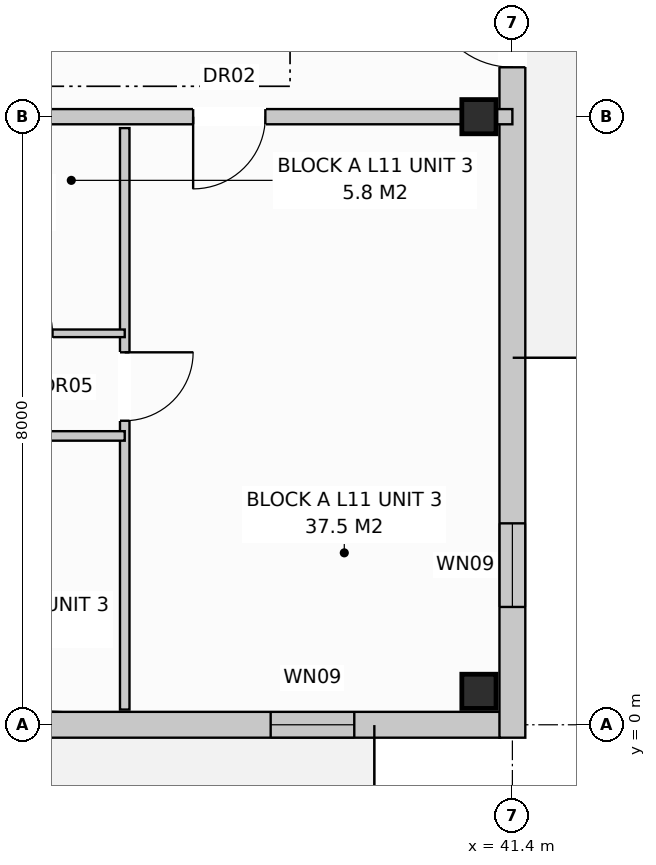
"""IFC4 building model, lengths in metres.
Left out: names, types, materials, properties, quantities, classifications, styles, units other than length and angle.
Written with IfcOpenShell. Run it as: python <this file> out.ifc"""

import sys

from ifc_helpers import new_model, si_unit, direction, frame, frame_2d, origin, origin_with_axes, origin_2d, place, context, subcontext, project, spatial, rectangle, extrude, element, fill, save


model = new_model("IFC4")
c1 = context("Model", 3, precision=1e-05, world=origin(), true_north=direction((0.0, 1.0)))
c2 = subcontext(c1, "Body", "Model", "MODEL_VIEW")
j1 = project(units=[si_unit("LENGTHUNIT", "METRE"), si_unit("PLANEANGLEUNIT", "RADIAN")], contexts=[c1])
p1 = place(None, origin())
s1 = spatial("IfcSite", under=j1, at=p1, CompositionType="ELEMENT")
p2 = place(p1, origin())
s2 = spatial("IfcBuilding", under=s1, at=p2, CompositionType="ELEMENT")
p3 = place(p2, frame((0.0, 0.0, 36.8)))
s3 = spatial("IfcBuildingStorey", under=s2, at=p3, CompositionType="ELEMENT", Elevation=36.8)
for number, where, z_axis, x_axis in (
    (1, (40.96, 0.44, 0.0), (0.0, 0.0, 1.0), (1.0, 0.0, 0.0)),
    (2, (40.96, 8.0, 0.0), (0.0, 0.0, 1.0), (1.0, 0.0, 0.0)),
):
    element("IfcColumn", number, at=place(p3, frame(where, z_axis=z_axis, x_axis=x_axis)), inside=s3, PredefinedType="COLUMN", context=c2, shape_type="SweptSolid", body=[
        extrude(rectangle(XDim=0.45, YDim=0.45, at=origin_2d()), origin(), (0.0, 0.0, 1.0), 3.2),
    ])
p4 = place(p3, frame((0.16, 0.0, 0.0), z_axis=(0.0, 0.0, 1.0), x_axis=(1.0, 0.0, 0.0)))
e3 = element("IfcWall", 3, at=p4, inside=s3, PredefinedType="STANDARD", context=c2, shape_type="SweptSolid", body=[
    extrude(rectangle(XDim=41.08, YDim=0.34, at=frame_2d((20.54, 0.0))), origin(), (0.0, 0.0, 1.0), 2.97),
])
p5 = place(p4, frame((4.926, 0.0, 0.0)))
e4 = element("IfcOpeningElement", 4, at=p5, cuts=e3, PredefinedType="OPENING", context=c2, shape_type="SweptSolid", body=[
    extrude(rectangle(XDim=0.95, YDim=2.1, at=frame_2d((0.475, 1.05))), frame((0.0, 0.182, 0.0), z_axis=(0.0, -1.0, 0.0), x_axis=(1.0, 0.0, 0.0)), (0.0, 0.0, 1.0), 0.364),
])
p6 = place(p4, frame((18.91, 0.0, 0.0)))
e5 = element("IfcOpeningElement", 5, at=p6, cuts=e3, PredefinedType="OPENING", context=c2, shape_type="SweptSolid", body=[
    extrude(rectangle(XDim=0.95, YDim=2.1, at=frame_2d((0.475, 1.05))), frame((0.0, 0.182, 0.0), z_axis=(0.0, -1.0, 0.0), x_axis=(1.0, 0.0, 0.0)), (0.0, 0.0, 1.0), 0.364),
])
p7 = place(p4, frame((30.426, 0.0, 0.0)))
e6 = element("IfcOpeningElement", 6, at=p7, cuts=e3, PredefinedType="OPENING", context=c2, shape_type="SweptSolid", body=[
    extrude(rectangle(XDim=0.95, YDim=2.1, at=frame_2d((0.475, 1.05))), frame((0.0, 0.182, 0.0), z_axis=(0.0, -1.0, 0.0), x_axis=(1.0, 0.0, 0.0)), (0.0, 0.0, 1.0), 0.364),
])
p8 = place(p4, frame((2.46, 0.0, 0.72)))
e7 = element("IfcOpeningElement", 7, at=p8, cuts=e3, PredefinedType="OPENING", context=c2, shape_type="SweptSolid", body=[
    extrude(rectangle(XDim=1.1, YDim=1.5, at=frame_2d((0.55, 0.75))), frame((0.0, 0.182, 0.0), z_axis=(0.0, -1.0, 0.0), x_axis=(1.0, 0.0, 0.0)), (0.0, 0.0, 1.0), 0.364),
])
p9 = place(p4, frame((7.76, 0.0, 0.72)))
e8 = element("IfcOpeningElement", 8, at=p9, cuts=e3, PredefinedType="OPENING", context=c2, shape_type="SweptSolid", body=[
    extrude(rectangle(XDim=1.9, YDim=1.85, at=frame_2d((0.95, 0.925))), frame((0.0, 0.182, 0.0), z_axis=(0.0, -1.0, 0.0), x_axis=(1.0, 0.0, 0.0)), (0.0, 0.0, 1.0), 0.364),
])
p10 = place(p4, frame((14.56, 0.0, 0.72)))
e9 = element("IfcOpeningElement", 9, at=p10, cuts=e3, PredefinedType="OPENING", context=c2, shape_type="SweptSolid", body=[
    extrude(rectangle(XDim=1.1, YDim=1.5, at=frame_2d((0.55, 0.75))), frame((0.0, 0.182, 0.0), z_axis=(0.0, -1.0, 0.0), x_axis=(1.0, 0.0, 0.0)), (0.0, 0.0, 1.0), 0.364),
])
p11 = place(p4, frame((16.81, 0.0, 0.8)))
e10 = element("IfcOpeningElement", 10, at=p11, cuts=e3, PredefinedType="OPENING", context=c2, shape_type="SweptSolid", body=[
    extrude(rectangle(XDim=1.8, YDim=1.7, at=frame_2d((0.9, 0.85))), frame((0.0, 0.182, 0.0), z_axis=(0.0, -1.0, 0.0), x_axis=(1.0, 0.0, 0.0)), (0.0, 0.0, 1.0), 0.364),
])
p12 = place(p4, frame((21.56, 0.0, 0.72)))
e11 = element("IfcOpeningElement", 11, at=p12, cuts=e3, PredefinedType="OPENING", context=c2, shape_type="SweptSolid", body=[
    extrude(rectangle(XDim=1.9, YDim=1.85, at=frame_2d((0.95, 0.925))), frame((0.0, 0.182, 0.0), z_axis=(0.0, -1.0, 0.0), x_axis=(1.0, 0.0, 0.0)), (0.0, 0.0, 1.0), 0.364),
])
p13 = place(p4, frame((25.36, 0.0, 0.72)))
e12 = element("IfcOpeningElement", 12, at=p13, cuts=e3, PredefinedType="OPENING", context=c2, shape_type="SweptSolid", body=[
    extrude(rectangle(XDim=1.1, YDim=1.5, at=frame_2d((0.55, 0.75))), frame((0.0, 0.182, 0.0), z_axis=(0.0, -1.0, 0.0), x_axis=(1.0, 0.0, 0.0)), (0.0, 0.0, 1.0), 0.364),
])
p14 = place(p4, frame((28.66, 0.0, 0.72)))
e13 = element("IfcOpeningElement", 13, at=p14, cuts=e3, PredefinedType="OPENING", context=c2, shape_type="SweptSolid", body=[
    extrude(rectangle(XDim=1.1, YDim=1.5, at=frame_2d((0.55, 0.75))), frame((0.0, 0.182, 0.0), z_axis=(0.0, -1.0, 0.0), x_axis=(1.0, 0.0, 0.0)), (0.0, 0.0, 1.0), 0.364),
])
p15 = place(p4, frame((31.96, 0.0, 0.72)))
e14 = element("IfcOpeningElement", 14, at=p15, cuts=e3, PredefinedType="OPENING", context=c2, shape_type="SweptSolid", body=[
    extrude(rectangle(XDim=1.9, YDim=1.85, at=frame_2d((0.95, 0.925))), frame((0.0, 0.182, 0.0), z_axis=(0.0, -1.0, 0.0), x_axis=(1.0, 0.0, 0.0)), (0.0, 0.0, 1.0), 0.364),
])
p16 = place(p4, frame((38.06, 0.0, 0.72)))
e15 = element("IfcOpeningElement", 15, at=p16, cuts=e3, PredefinedType="OPENING", context=c2, shape_type="SweptSolid", body=[
    extrude(rectangle(XDim=1.1, YDim=1.5, at=frame_2d((0.55, 0.75))), frame((0.0, 0.182, 0.0), z_axis=(0.0, -1.0, 0.0), x_axis=(1.0, 0.0, 0.0)), (0.0, 0.0, 1.0), 0.364),
])
p17 = place(p3, frame((41.4, -0.17, 0.0), z_axis=(0.0, 0.0, 1.0), x_axis=(0.0, 1.0, 0.0)))
e16 = element("IfcWall", 16, at=p17, inside=s3, PredefinedType="STANDARD", context=c2, shape_type="SweptSolid", body=[
    extrude(rectangle(XDim=18.74, YDim=0.34, at=frame_2d((9.37, 0.0))), origin(), (0.0, 0.0, 1.0), 2.97),
])
p18 = place(p17, frame((8.82, 0.0, 0.0)))
e17 = element("IfcOpeningElement", 17, at=p18, cuts=e16, PredefinedType="OPENING", context=c2, shape_type="SweptSolid", body=[
    extrude(rectangle(XDim=1.1, YDim=2.1, at=frame_2d((0.55, 1.05))), frame((0.0, 0.182, 0.0), z_axis=(0.0, -1.0, 0.0), x_axis=(1.0, 0.0, 0.0)), (0.0, 0.0, 1.0), 0.364),
])
p19 = place(p17, frame((1.72, 0.0, 0.72)))
e18 = element("IfcOpeningElement", 18, at=p19, cuts=e16, PredefinedType="OPENING", context=c2, shape_type="SweptSolid", body=[
    extrude(rectangle(XDim=1.1, YDim=1.5, at=frame_2d((0.55, 0.75))), frame((0.0, 0.182, 0.0), z_axis=(0.0, -1.0, 0.0), x_axis=(1.0, 0.0, 0.0)), (0.0, 0.0, 1.0), 0.364),
])
p20 = place(p17, frame((15.92, 0.0, 0.72)))
e19 = element("IfcOpeningElement", 19, at=p20, cuts=e16, PredefinedType="OPENING", context=c2, shape_type="SweptSolid", body=[
    extrude(rectangle(XDim=1.1, YDim=1.5, at=frame_2d((0.55, 0.75))), frame((0.0, 0.182, 0.0), z_axis=(0.0, -1.0, 0.0), x_axis=(1.0, 0.0, 0.0)), (0.0, 0.0, 1.0), 0.364),
])
p21 = place(p3, frame((27.6, 8.0, 0.0), z_axis=(0.0, 0.0, 1.0), x_axis=(1.0, 0.0, 0.0)))
e20 = element("IfcWall", 20, at=p21, inside=s3, PredefinedType="PARTITIONING", context=c2, shape_type="SweptSolid", body=[
    extrude(rectangle(XDim=13.8, YDim=0.2, at=frame_2d((6.9, 0.0))), origin(), (0.0, 0.0, 1.0), 2.41),
])
p22 = place(p21, frame((9.6, 0.0, 0.0)))
e21 = element("IfcOpeningElement", 21, at=p22, cuts=e20, PredefinedType="OPENING", context=c2, shape_type="SweptSolid", body=[
    extrude(rectangle(XDim=0.95, YDim=2.15, at=frame_2d((0.475, 1.075))), frame((0.0, 0.112, 0.0), z_axis=(0.0, -1.0, 0.0), x_axis=(1.0, 0.0, 0.0)), (0.0, 0.0, 1.0), 0.224),
])
p23 = place(p3, frame((36.3, 7.85, 0.0), z_axis=(0.0, 0.0, 1.0), x_axis=(0.0, -1.0, 0.0)))
e22 = element("IfcWall", 22, at=p23, inside=s3, PredefinedType="PARTITIONING", context=c2, shape_type="SweptSolid", body=[
    extrude(rectangle(XDim=7.65, YDim=0.125, at=frame_2d((3.825, 0.0))), origin(), (0.0, 0.0, 1.0), 2.97),
])
p24 = place(p23, frame((2.95, 0.0, 0.0)))
e23 = element("IfcOpeningElement", 23, at=p24, cuts=e22, PredefinedType="OPENING", context=c2, shape_type="SweptSolid", body=[
    extrude(rectangle(XDim=0.9, YDim=2.1, at=frame_2d((0.45, 1.05))), frame((0.0, 0.074, 0.0), z_axis=(0.0, -1.0, 0.0), x_axis=(1.0, 0.0, 0.0)), (0.0, 0.0, 1.0), 0.149),
])
p25 = place(p3, frame((27.7, 5.15, 0.0), z_axis=(0.0, 0.0, 1.0), x_axis=(1.0, 0.0, 0.0)))
e24 = element("IfcWall", 24, at=p25, inside=s3, PredefinedType="PARTITIONING", context=c2, shape_type="SweptSolid", body=[
    extrude(rectangle(XDim=8.6, YDim=0.1, at=frame_2d((4.3, 0.0))), origin(), (0.0, 0.0, 1.0), 2.97),
])
p26 = place(p25, frame((1.4, 0.0, 0.0)))
e25 = element("IfcOpeningElement", 25, at=p26, cuts=e24, PredefinedType="OPENING", context=c2, shape_type="SweptSolid", body=[
    extrude(rectangle(XDim=0.85, YDim=2.05, at=frame_2d((0.425, 1.025))), frame((0.0, 0.062, 0.0), z_axis=(0.0, -1.0, 0.0), x_axis=(1.0, 0.0, 0.0)), (0.0, 0.0, 1.0), 0.124),
])
p27 = place(p25, frame((4.65, 0.0, 0.0)))
e26 = element("IfcOpeningElement", 26, at=p27, cuts=e24, PredefinedType="OPENING", context=c2, shape_type="SweptSolid", body=[
    extrude(rectangle(XDim=0.85, YDim=2.05, at=frame_2d((0.425, 1.025))), frame((0.0, 0.062, 0.0), z_axis=(0.0, -1.0, 0.0), x_axis=(1.0, 0.0, 0.0)), (0.0, 0.0, 1.0), 0.124),
])
p28 = place(p25, frame((6.8, 0.0, 0.0)))
e27 = element("IfcOpeningElement", 27, at=p28, cuts=e24, PredefinedType="OPENING", context=c2, shape_type="SweptSolid", body=[
    extrude(rectangle(XDim=0.85, YDim=2.1, at=frame_2d((0.425, 1.05))), frame((0.0, 0.062, 0.0), z_axis=(0.0, -1.0, 0.0), x_axis=(1.0, 0.0, 0.0)), (0.0, 0.0, 1.0), 0.124),
])
p29 = place(p3, frame((31.8, 3.8, 0.0), z_axis=(0.0, 0.0, 1.0), x_axis=(1.0, 0.0, 0.0)))
e28 = element("IfcWall", 28, at=p29, inside=s3, PredefinedType="PARTITIONING", context=c2, shape_type="SweptSolid", body=[
    extrude(rectangle(XDim=4.5, YDim=0.125, at=frame_2d((2.25, 0.0))), origin(), (0.0, 0.0, 1.0), 2.97),
])
p30 = place(p29, frame((1.6, 0.0, 0.0)))
e29 = element("IfcOpeningElement", 29, at=p30, cuts=e28, PredefinedType="OPENING", context=c2, shape_type="SweptSolid", body=[
    extrude(rectangle(XDim=0.9, YDim=2.1, at=frame_2d((0.45, 1.05))), frame((0.0, 0.074, 0.0), z_axis=(0.0, -1.0, 0.0), x_axis=(1.0, 0.0, 0.0)), (0.0, 0.0, 1.0), 0.149),
])
p31 = place(p16, origin_with_axes())
e30 = element("IfcWindow", 30, at=p31, inside=s3, PartitioningType="SINGLE_PANEL", PredefinedType="WINDOW", context=c2, shape_type="SweptSolid", body=[
    extrude(rectangle(XDim=1.1, YDim=1.5, at=frame_2d((0.55, 0.75))), frame((0.0, 0.03, 0.0), z_axis=(0.0, -1.0, 0.0), x_axis=(1.0, 0.0, 0.0)), (0.0, 0.0, 1.0), 0.06),
])
fill(e15, e30)
p32 = place(p18, origin_with_axes())
e31 = element("IfcDoor", 31, at=p32, inside=s3, OperationType="SINGLE_SWING_RIGHT", PredefinedType="DOOR", context=c2, shape_type="SweptSolid", body=[
    extrude(rectangle(XDim=1.1, YDim=2.1, at=frame_2d((0.55, 1.05))), frame((0.0, 0.025, 0.0), z_axis=(0.0, -1.0, 0.0), x_axis=(1.0, 0.0, 0.0)), (0.0, 0.0, 1.0), 0.05),
])
fill(e17, e31)
p33 = place(p19, origin_with_axes())
e32 = element("IfcWindow", 32, at=p33, inside=s3, PartitioningType="SINGLE_PANEL", PredefinedType="WINDOW", context=c2, shape_type="SweptSolid", body=[
    extrude(rectangle(XDim=1.1, YDim=1.5, at=frame_2d((0.55, 0.75))), frame((0.0, 0.03, 0.0), z_axis=(0.0, -1.0, 0.0), x_axis=(1.0, 0.0, 0.0)), (0.0, 0.0, 1.0), 0.06),
])
fill(e18, e32)
p34 = place(p22, frame((0.95, 0.0, 0.0), z_axis=(0.0, 0.0, 1.0), x_axis=(-1.0, 0.0, 0.0)))
e33 = element("IfcDoor", 33, at=p34, inside=s3, OperationType="SINGLE_SWING_LEFT", PredefinedType="DOOR", context=c2, shape_type="SweptSolid", body=[
    extrude(rectangle(XDim=0.95, YDim=2.15, at=frame_2d((0.475, 1.075))), frame((0.0, 0.025, 0.0), z_axis=(0.0, -1.0, 0.0), x_axis=(1.0, 0.0, 0.0)), (0.0, 0.0, 1.0), 0.05),
])
fill(e21, e33)
p35 = place(p24, origin_with_axes())
e34 = element("IfcDoor", 34, at=p35, inside=s3, OperationType="SINGLE_SWING_LEFT", PredefinedType="DOOR", context=c2, shape_type="SweptSolid", body=[
    extrude(rectangle(XDim=0.9, YDim=2.1, at=frame_2d((0.45, 1.05))), frame((0.0, 0.025, 0.0), z_axis=(0.0, -1.0, 0.0), x_axis=(1.0, 0.0, 0.0)), (0.0, 0.0, 1.0), 0.05),
])
fill(e23, e34)
save(model, sys.argv[1])
